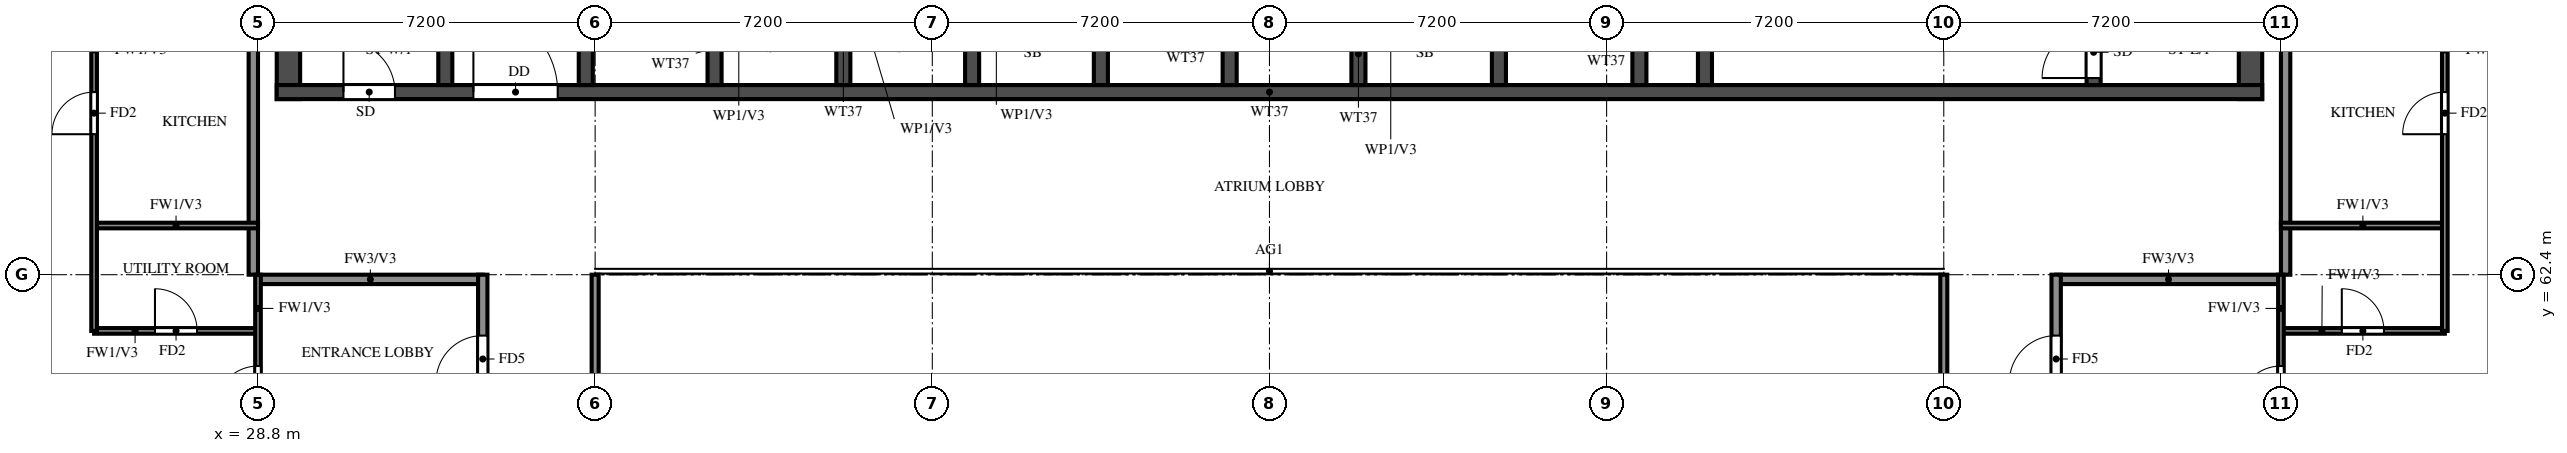
"""IFC4 building model, lengths in metres.
Left out: names, types, materials, properties, quantities, classifications, styles, units other than length and angle.
Written with IfcOpenShell. Run it as: python <this file> out.ifc"""

import sys

from ifc_helpers import new_model, si_unit, direction, frame, frame_2d, origin, place, context, subcontext, project, spatial, rectangle, extrude, element, fill, save


model = new_model("IFC4")
c1 = context("Model", 3, precision=1e-05, world=origin(), true_north=direction((0.0, 1.0)))
c2 = subcontext(c1, "Body", "Model", "MODEL_VIEW")
j1 = project(units=[si_unit("LENGTHUNIT", "METRE"), si_unit("PLANEANGLEUNIT", "RADIAN")], contexts=[c1])
p1 = place(None, origin())
s1 = spatial("IfcSite", under=j1, at=p1, CompositionType="ELEMENT")
p2 = place(p1, origin())
s2 = spatial("IfcBuilding", under=s1, at=p2, CompositionType="ELEMENT")
p3 = place(p2, frame((0.0, 0.0, 211.5)))
s3 = spatial("IfcBuildingStorey", under=s2, at=p3, CompositionType="ELEMENT", Elevation=211.5)
for number, where, z_axis, x_axis in (
    (1, (29.45, 66.15, 0.0), (0.0, 0.0, 1.0), (0.0, 1.0, 0.0)),
    (2, (71.35, 66.15, 0.0), (0.0, 0.0, 1.0), (0.0, 1.0, 0.0)),
):
    element("IfcWall", number, at=place(p3, frame(where, z_axis=z_axis, x_axis=x_axis)), inside=s3, PredefinedType="SHEAR", context=c2, shape_type="SweptSolid", body=[
        extrude(rectangle(XDim=11.85, YDim=0.5, at=frame_2d((5.925, 0.0))), origin(), (0.0, 0.0, 1.0), 3.22),
    ])
p4 = place(p3, frame((29.2, 66.3, 0.0), z_axis=(0.0, 0.0, 1.0), x_axis=(1.0, 0.0, 0.0)))
e3 = element("IfcWall", 3, at=p4, inside=s3, PredefinedType="SHEAR", context=c2, shape_type="SweptSolid", body=[
    extrude(rectangle(XDim=42.4, YDim=0.3, at=frame_2d((21.2, 0.0))), origin(), (0.0, 0.0, 1.0), 3.22),
])
p5 = place(p4, frame((1.425, 0.0, 0.0)))
e4 = element("IfcOpeningElement", 4, at=p5, cuts=e3, PredefinedType="OPENING", context=c2, shape_type="SweptSolid", body=[
    extrude(rectangle(XDim=1.1, YDim=2.1, at=frame_2d((0.55, 1.05))), frame((0.0, 0.16, 0.0), z_axis=(0.0, -1.0, 0.0), x_axis=(1.0, 0.0, 0.0)), (0.0, 0.0, 1.0), 0.32),
])
p6 = place(p4, frame((4.2, 0.0, 0.0)))
e5 = element("IfcOpeningElement", 5, at=p6, cuts=e3, PredefinedType="OPENING", context=c2, shape_type="SweptSolid", body=[
    extrude(rectangle(XDim=1.8, YDim=2.1, at=frame_2d((0.9, 1.05))), frame((0.0, 0.16, 0.0), z_axis=(0.0, -1.0, 0.0), x_axis=(1.0, 0.0, 0.0)), (0.0, 0.0, 1.0), 0.32),
])
p7 = place(p3, frame((32.8, 66.45, 0.0), z_axis=(0.0, 0.0, 1.0), x_axis=(0.0, 1.0, 0.0)))
e6 = element("IfcWall", 6, at=p7, inside=s3, PredefinedType="SHEAR", context=c2, shape_type="SweptSolid", body=[
    extrude(rectangle(XDim=11.05, YDim=0.3, at=frame_2d((5.525, 0.0))), origin(), (0.0, 0.0, 1.0), 3.22),
])
p8 = place(p3, frame((68.0, 66.45, 0.0), z_axis=(0.0, 0.0, 1.0), x_axis=(0.0, 1.0, 0.0)))
e7 = element("IfcWall", 7, at=p8, inside=s3, PredefinedType="SHEAR", context=c2, shape_type="SweptSolid", body=[
    extrude(rectangle(XDim=11.05, YDim=0.3, at=frame_2d((5.525, 0.0))), origin(), (0.0, 0.0, 1.0), 3.22),
])
p9 = place(p8, frame((0.15, 0.0, 0.0)))
e8 = element("IfcOpeningElement", 8, at=p9, cuts=e7, PredefinedType="OPENING", context=c2, shape_type="SweptSolid", body=[
    extrude(rectangle(XDim=1.1, YDim=2.1, at=frame_2d((0.55, 1.05))), frame((0.0, 0.16, 0.0), z_axis=(0.0, -1.0, 0.0), x_axis=(1.0, 0.0, 0.0)), (0.0, 0.0, 1.0), 0.32),
])
p10 = place(p3, frame((59.7, 66.45, 0.0), z_axis=(0.0, 0.0, 1.0), x_axis=(0.0, 1.0, 0.0)))
e9 = element("IfcWall", 9, at=p10, inside=s3, PredefinedType="SHEAR", context=c2, shape_type="SweptSolid", body=[
    extrude(rectangle(XDim=6.175, YDim=0.3, at=frame_2d((3.087, 0.0))), origin(), (0.0, 0.0, 1.0), 3.22),
])
p11 = place(p10, frame((3.85, 0.0, 0.0)))
e10 = element("IfcOpeningElement", 10, at=p11, cuts=e9, PredefinedType="OPENING", context=c2, shape_type="SweptSolid", body=[
    extrude(rectangle(XDim=1.2, YDim=2.1, at=frame_2d((0.6, 1.05))), frame((0.0, 0.16, 0.0), z_axis=(0.0, -1.0, 0.0), x_axis=(1.0, 0.0, 0.0)), (0.0, 0.0, 1.0), 0.32),
])
for number, where, z_axis, x_axis in (
    (11, (35.8, 66.45, 0.0), (0.0, 0.0, 1.0), (0.0, 1.0, 0.0)),
    (12, (38.55, 66.45, 0.0), (0.0, 0.0, 1.0), (0.0, 1.0, 0.0)),
    (13, (41.3, 66.45, 0.0), (0.0, 0.0, 1.0), (0.0, 1.0, 0.0)),
    (14, (44.05, 66.45, 0.0), (0.0, 0.0, 1.0), (0.0, 1.0, 0.0)),
    (15, (46.8, 66.45, 0.0), (0.0, 0.0, 1.0), (0.0, 1.0, 0.0)),
    (16, (49.55, 66.45, 0.0), (0.0, 0.0, 1.0), (0.0, 1.0, 0.0)),
    (17, (52.3, 66.45, 0.0), (0.0, 0.0, 1.0), (0.0, 1.0, 0.0)),
    (18, (55.3, 66.45, 0.0), (0.0, 0.0, 1.0), (0.0, 1.0, 0.0)),
    (19, (58.3, 66.45, 0.0), (0.0, 0.0, 1.0), (0.0, 1.0, 0.0)),
):
    element("IfcWall", number, at=place(p3, frame(where, z_axis=z_axis, x_axis=x_axis)), inside=s3, PredefinedType="SHEAR", context=c2, shape_type="SweptSolid", body=[
        extrude(rectangle(XDim=2.425, YDim=0.3, at=frame_2d((1.212, 0.0))), origin(), (0.0, 0.0, 1.0), 3.22),
    ])
for number, where, z_axis, x_axis in (
    (20, (28.8, 62.3, 0.0), (0.0, 0.0, 1.0), (1.0, 0.0, 0.0)),
    (21, (67.2, 62.3, 0.0), (0.0, 0.0, 1.0), (1.0, 0.0, 0.0)),
):
    element("IfcWall", number, at=place(p3, frame(where, z_axis=z_axis, x_axis=x_axis)), inside=s3, PredefinedType="SOLIDWALL", context=c2, shape_type="SweptSolid", body=[
        extrude(rectangle(XDim=4.8, YDim=0.2, at=frame_2d((2.4, 0.0))), origin(), (0.0, 0.0, 1.0), 3.22),
    ])
p12 = place(p3, frame((28.7, 62.4, 0.0), z_axis=(0.0, 0.0, 1.0), x_axis=(0.0, 1.0, 0.0)))
e22 = element("IfcWall", 22, at=p12, inside=s3, PredefinedType="SOLIDWALL", context=c2, shape_type="SweptSolid", body=[
    extrude(rectangle(XDim=15.6, YDim=0.2, at=frame_2d((7.8, 0.0))), origin(), (0.0, 0.0, 1.0), 3.22),
])
p13 = place(p3, frame((33.6, 56.4, 0.0), z_axis=(0.0, 0.0, 1.0), x_axis=(0.0, 1.0, 0.0)))
e23 = element("IfcWall", 23, at=p13, inside=s3, PredefinedType="SOLIDWALL", context=c2, shape_type="SweptSolid", body=[
    extrude(rectangle(XDim=6.0, YDim=0.2, at=frame_2d((3.0, 0.0))), origin(), (0.0, 0.0, 1.0), 3.22),
])
p14 = place(p13, frame((3.7, 0.0, 0.0)))
e24 = element("IfcOpeningElement", 24, at=p14, cuts=e23, PredefinedType="OPENING", context=c2, shape_type="SweptSolid", body=[
    extrude(rectangle(XDim=1.0, YDim=2.1, at=frame_2d((0.5, 1.05))), frame((0.0, 0.11, 0.0), z_axis=(0.0, -1.0, 0.0), x_axis=(1.0, 0.0, 0.0)), (0.0, 0.0, 1.0), 0.22),
])
p15 = place(p3, frame((67.2, 56.4, 0.0), z_axis=(0.0, 0.0, 1.0), x_axis=(0.0, 1.0, 0.0)))
e25 = element("IfcWall", 25, at=p15, inside=s3, PredefinedType="SOLIDWALL", context=c2, shape_type="SweptSolid", body=[
    extrude(rectangle(XDim=6.0, YDim=0.2, at=frame_2d((3.0, 0.0))), origin(), (0.0, 0.0, 1.0), 3.22),
])
p16 = place(p15, frame((3.7, 0.0, 0.0)))
e26 = element("IfcOpeningElement", 26, at=p16, cuts=e25, PredefinedType="OPENING", context=c2, shape_type="SweptSolid", body=[
    extrude(rectangle(XDim=1.0, YDim=2.1, at=frame_2d((0.5, 1.05))), frame((0.0, 0.11, 0.0), z_axis=(0.0, -1.0, 0.0), x_axis=(1.0, 0.0, 0.0)), (0.0, 0.0, 1.0), 0.22),
])
p17 = place(p3, frame((72.1, 62.4, 0.0), z_axis=(0.0, 0.0, 1.0), x_axis=(0.0, 1.0, 0.0)))
e27 = element("IfcWall", 27, at=p17, inside=s3, PredefinedType="SOLIDWALL", context=c2, shape_type="SweptSolid", body=[
    extrude(rectangle(XDim=15.6, YDim=0.2, at=frame_2d((7.8, 0.0))), origin(), (0.0, 0.0, 1.0), 3.22),
])
p18 = place(p3, frame((25.3, 61.2, 0.0), z_axis=(0.0, 0.0, 1.0), x_axis=(1.0, 0.0, 0.0)))
e28 = element("IfcWall", 28, at=p18, inside=s3, PredefinedType="PARTITIONING", context=c2, shape_type="SweptSolid", body=[
    extrude(rectangle(XDim=3.5, YDim=0.12, at=frame_2d((1.75, 0.0))), origin(), (0.0, 0.0, 1.0), 3.22),
])
p19 = place(p18, frame((1.3, 0.0, 0.0)))
e29 = element("IfcOpeningElement", 29, at=p19, cuts=e28, PredefinedType="OPENING", context=c2, shape_type="SweptSolid", body=[
    extrude(rectangle(XDim=0.9, YDim=2.1, at=frame_2d((0.45, 1.05))), frame((0.0, 0.07, 0.0), z_axis=(0.0, -1.0, 0.0), x_axis=(1.0, 0.0, 0.0)), (0.0, 0.0, 1.0), 0.14),
])
p20 = place(p3, frame((72.0, 61.2, 0.0), z_axis=(0.0, 0.0, 1.0), x_axis=(1.0, 0.0, 0.0)))
e30 = element("IfcWall", 30, at=p20, inside=s3, PredefinedType="PARTITIONING", context=c2, shape_type="SweptSolid", body=[
    extrude(rectangle(XDim=3.5, YDim=0.12, at=frame_2d((1.75, 0.0))), origin(), (0.0, 0.0, 1.0), 3.22),
])
p21 = place(p20, frame((1.3, 0.0, 0.0)))
e31 = element("IfcOpeningElement", 31, at=p21, cuts=e30, PredefinedType="OPENING", context=c2, shape_type="SweptSolid", body=[
    extrude(rectangle(XDim=0.9, YDim=2.1, at=frame_2d((0.45, 1.05))), frame((0.0, 0.07, 0.0), z_axis=(0.0, -1.0, 0.0), x_axis=(1.0, 0.0, 0.0)), (0.0, 0.0, 1.0), 0.14),
])
for number, where, z_axis, x_axis in (
    (32, (25.3, 63.45, 0.0), (0.0, 0.0, 1.0), (1.0, 0.0, 0.0)),
    (33, (72.0, 63.45, 0.0), (0.0, 0.0, 1.0), (1.0, 0.0, 0.0)),
):
    element("IfcWall", number, at=place(p3, frame(where, z_axis=z_axis, x_axis=x_axis)), inside=s3, PredefinedType="PARTITIONING", context=c2, shape_type="SweptSolid", body=[
        extrude(rectangle(XDim=3.5, YDim=0.12, at=frame_2d((1.75, 0.0))), origin(), (0.0, 0.0, 1.0), 3.22),
    ])
p22 = place(p3, frame((25.3, 61.2, 0.0), z_axis=(0.0, 0.0, 1.0), x_axis=(0.0, 1.0, 0.0)))
e34 = element("IfcWall", 34, at=p22, inside=s3, PredefinedType="PARTITIONING", context=c2, shape_type="SweptSolid", body=[
    extrude(rectangle(XDim=12.0, YDim=0.12, at=frame_2d((6.0, 0.0))), origin(), (0.0, 0.0, 1.0), 3.22),
])
p23 = place(p22, frame((4.2, 0.0, 0.0)))
e35 = element("IfcOpeningElement", 35, at=p23, cuts=e34, PredefinedType="OPENING", context=c2, shape_type="SweptSolid", body=[
    extrude(rectangle(XDim=0.9, YDim=2.1, at=frame_2d((0.45, 1.05))), frame((0.0, 0.07, 0.0), z_axis=(0.0, -1.0, 0.0), x_axis=(1.0, 0.0, 0.0)), (0.0, 0.0, 1.0), 0.14),
])
p24 = place(p22, frame((7.975, 0.0, 0.0)))
e36 = element("IfcOpeningElement", 36, at=p24, cuts=e34, PredefinedType="OPENING", context=c2, shape_type="SweptSolid", body=[
    extrude(rectangle(XDim=0.8, YDim=2.1, at=frame_2d((0.4, 1.05))), frame((0.0, 0.07, 0.0), z_axis=(0.0, -1.0, 0.0), x_axis=(1.0, 0.0, 0.0)), (0.0, 0.0, 1.0), 0.14),
])
p25 = place(p22, frame((10.45, 0.0, 0.0)))
e37 = element("IfcOpeningElement", 37, at=p25, cuts=e34, PredefinedType="OPENING", context=c2, shape_type="SweptSolid", body=[
    extrude(rectangle(XDim=0.8, YDim=2.1, at=frame_2d((0.4, 1.05))), frame((0.0, 0.07, 0.0), z_axis=(0.0, -1.0, 0.0), x_axis=(1.0, 0.0, 0.0)), (0.0, 0.0, 1.0), 0.14),
])
p26 = place(p3, frame((28.8, 58.8, 0.0), z_axis=(0.0, 0.0, 1.0), x_axis=(0.0, 1.0, 0.0)))
e38 = element("IfcWall", 38, at=p26, inside=s3, PredefinedType="PARTITIONING", context=c2, shape_type="SweptSolid", body=[
    extrude(rectangle(XDim=3.6, YDim=0.12, at=frame_2d((1.8, 0.0))), origin(), (0.0, 0.0, 1.0), 3.22),
])
p27 = place(p26, frame((0.75, 0.0, 0.0)))
e39 = element("IfcOpeningElement", 39, at=p27, cuts=e38, PredefinedType="OPENING", context=c2, shape_type="SweptSolid", body=[
    extrude(rectangle(XDim=0.9, YDim=2.1, at=frame_2d((0.45, 1.05))), frame((0.0, 0.07, 0.0), z_axis=(0.0, -1.0, 0.0), x_axis=(1.0, 0.0, 0.0)), (0.0, 0.0, 1.0), 0.14),
])
p28 = place(p3, frame((72.0, 58.8, 0.0), z_axis=(0.0, 0.0, 1.0), x_axis=(0.0, 1.0, 0.0)))
e40 = element("IfcWall", 40, at=p28, inside=s3, PredefinedType="PARTITIONING", context=c2, shape_type="SweptSolid", body=[
    extrude(rectangle(XDim=3.6, YDim=0.12, at=frame_2d((1.8, 0.0))), origin(), (0.0, 0.0, 1.0), 3.22),
])
p29 = place(p28, frame((0.75, 0.0, 0.0)))
e41 = element("IfcOpeningElement", 41, at=p29, cuts=e40, PredefinedType="OPENING", context=c2, shape_type="SweptSolid", body=[
    extrude(rectangle(XDim=0.9, YDim=2.1, at=frame_2d((0.45, 1.05))), frame((0.0, 0.07, 0.0), z_axis=(0.0, -1.0, 0.0), x_axis=(1.0, 0.0, 0.0)), (0.0, 0.0, 1.0), 0.14),
])
p30 = place(p3, frame((75.5, 61.2, 0.0), z_axis=(0.0, 0.0, 1.0), x_axis=(0.0, 1.0, 0.0)))
e42 = element("IfcWall", 42, at=p30, inside=s3, PredefinedType="PARTITIONING", context=c2, shape_type="SweptSolid", body=[
    extrude(rectangle(XDim=12.0, YDim=0.12, at=frame_2d((6.0, 0.0))), origin(), (0.0, 0.0, 1.0), 3.22),
])
p31 = place(p30, frame((4.2, 0.0, 0.0)))
e43 = element("IfcOpeningElement", 43, at=p31, cuts=e42, PredefinedType="OPENING", context=c2, shape_type="SweptSolid", body=[
    extrude(rectangle(XDim=0.9, YDim=2.1, at=frame_2d((0.45, 1.05))), frame((0.0, 0.07, 0.0), z_axis=(0.0, -1.0, 0.0), x_axis=(1.0, 0.0, 0.0)), (0.0, 0.0, 1.0), 0.14),
])
p32 = place(p30, frame((7.975, 0.0, 0.0)))
e44 = element("IfcOpeningElement", 44, at=p32, cuts=e42, PredefinedType="OPENING", context=c2, shape_type="SweptSolid", body=[
    extrude(rectangle(XDim=0.8, YDim=2.1, at=frame_2d((0.4, 1.05))), frame((0.0, 0.07, 0.0), z_axis=(0.0, -1.0, 0.0), x_axis=(1.0, 0.0, 0.0)), (0.0, 0.0, 1.0), 0.14),
])
p33 = place(p30, frame((10.45, 0.0, 0.0)))
e45 = element("IfcOpeningElement", 45, at=p33, cuts=e42, PredefinedType="OPENING", context=c2, shape_type="SweptSolid", body=[
    extrude(rectangle(XDim=0.8, YDim=2.1, at=frame_2d((0.4, 1.05))), frame((0.0, 0.07, 0.0), z_axis=(0.0, -1.0, 0.0), x_axis=(1.0, 0.0, 0.0)), (0.0, 0.0, 1.0), 0.14),
])
for number, where, z_axis, x_axis in (
    (46, (36.0, 48.0, 0.0), (0.0, 0.0, 1.0), (0.0, 1.0, 0.0)),
    (47, (64.8, 48.0, 0.0), (0.0, 0.0, 1.0), (0.0, 1.0, 0.0)),
):
    element("IfcWall", number, at=place(p3, frame(where, z_axis=z_axis, x_axis=x_axis)), inside=s3, PredefinedType="SOLIDWALL", context=c2, shape_type="SweptSolid", body=[
        extrude(rectangle(XDim=14.4, YDim=0.15, at=frame_2d((7.2, 0.0))), origin(), (0.0, 0.0, 1.0), 2.32),
    ])
p34 = place(p5, origin())
e48 = element("IfcDoor", 48, at=p34, inside=s3, OperationType="SINGLE_SWING_LEFT", PredefinedType="DOOR", context=c2, shape_type="SweptSolid", body=[
    extrude(rectangle(XDim=1.1, YDim=2.1, at=frame_2d((0.55, 1.05))), frame((0.0, 0.025, 0.0), z_axis=(0.0, -1.0, 0.0), x_axis=(1.0, 0.0, 0.0)), (0.0, 0.0, 1.0), 0.05),
])
fill(e4, e48)
p35 = place(p9, origin())
e49 = element("IfcDoor", 49, at=p35, inside=s3, OperationType="SINGLE_SWING_RIGHT", PredefinedType="DOOR", context=c2, shape_type="SweptSolid", body=[
    extrude(rectangle(XDim=1.1, YDim=2.1, at=frame_2d((0.55, 1.05))), frame((0.0, 0.025, 0.0), z_axis=(0.0, -1.0, 0.0), x_axis=(1.0, 0.0, 0.0)), (0.0, 0.0, 1.0), 0.05),
])
fill(e8, e49)
p36 = place(p6, origin())
e50 = element("IfcDoor", 50, at=p36, inside=s3, OperationType="DOUBLE_DOOR_SINGLE_SWING", PredefinedType="DOOR", context=c2, shape_type="SweptSolid", body=[
    extrude(rectangle(XDim=1.8, YDim=2.1, at=frame_2d((0.9, 1.05))), frame((0.0, 0.025, 0.0), z_axis=(0.0, -1.0, 0.0), x_axis=(1.0, 0.0, 0.0)), (0.0, 0.0, 1.0), 0.05),
])
fill(e5, e50)
p37 = place(p27, origin())
e51 = element("IfcDoor", 51, at=p37, inside=s3, OperationType="SINGLE_SWING_RIGHT", PredefinedType="DOOR", context=c2, shape_type="SweptSolid", body=[
    extrude(rectangle(XDim=0.9, YDim=2.1, at=frame_2d((0.45, 1.05))), frame((0.0, 0.025, 0.0), z_axis=(0.0, -1.0, 0.0), x_axis=(1.0, 0.0, 0.0)), (0.0, 0.0, 1.0), 0.05),
])
fill(e39, e51)
p38 = place(p14, origin())
e52 = element("IfcDoor", 52, at=p38, inside=s3, OperationType="SINGLE_SWING_LEFT", PredefinedType="DOOR", context=c2, shape_type="SweptSolid", body=[
    extrude(rectangle(XDim=1.0, YDim=2.1, at=frame_2d((0.5, 1.05))), frame((0.0, 0.025, 0.0), z_axis=(0.0, -1.0, 0.0), x_axis=(1.0, 0.0, 0.0)), (0.0, 0.0, 1.0), 0.05),
])
fill(e24, e52)
p39 = place(p19, origin())
e53 = element("IfcDoor", 53, at=p39, inside=s3, OperationType="SINGLE_SWING_RIGHT", PredefinedType="DOOR", context=c2, shape_type="SweptSolid", body=[
    extrude(rectangle(XDim=0.9, YDim=2.1, at=frame_2d((0.45, 1.05))), frame((0.0, 0.025, 0.0), z_axis=(0.0, -1.0, 0.0), x_axis=(1.0, 0.0, 0.0)), (0.0, 0.0, 1.0), 0.05),
])
fill(e29, e53)
p40 = place(p23, origin())
e54 = element("IfcDoor", 54, at=p40, inside=s3, OperationType="SINGLE_SWING_LEFT", PredefinedType="DOOR", context=c2, shape_type="SweptSolid", body=[
    extrude(rectangle(XDim=0.9, YDim=2.1, at=frame_2d((0.45, 1.05))), frame((0.0, 0.025, 0.0), z_axis=(0.0, -1.0, 0.0), x_axis=(1.0, 0.0, 0.0)), (0.0, 0.0, 1.0), 0.05),
])
fill(e35, e54)
p41 = place(p29, origin())
e55 = element("IfcDoor", 55, at=p41, inside=s3, OperationType="SINGLE_SWING_LEFT", PredefinedType="DOOR", context=c2, shape_type="SweptSolid", body=[
    extrude(rectangle(XDim=0.9, YDim=2.1, at=frame_2d((0.45, 1.05))), frame((0.0, 0.025, 0.0), z_axis=(0.0, -1.0, 0.0), x_axis=(1.0, 0.0, 0.0)), (0.0, 0.0, 1.0), 0.05),
])
fill(e41, e55)
p42 = place(p16, origin())
e56 = element("IfcDoor", 56, at=p42, inside=s3, OperationType="SINGLE_SWING_LEFT", PredefinedType="DOOR", context=c2, shape_type="SweptSolid", body=[
    extrude(rectangle(XDim=1.0, YDim=2.1, at=frame_2d((0.5, 1.05))), frame((0.0, 0.025, 0.0), z_axis=(0.0, -1.0, 0.0), x_axis=(1.0, 0.0, 0.0)), (0.0, 0.0, 1.0), 0.05),
])
fill(e26, e56)
p43 = place(p21, origin())
e57 = element("IfcDoor", 57, at=p43, inside=s3, OperationType="SINGLE_SWING_LEFT", PredefinedType="DOOR", context=c2, shape_type="SweptSolid", body=[
    extrude(rectangle(XDim=0.9, YDim=2.1, at=frame_2d((0.45, 1.05))), frame((0.0, 0.025, 0.0), z_axis=(0.0, -1.0, 0.0), x_axis=(1.0, 0.0, 0.0)), (0.0, 0.0, 1.0), 0.05),
])
fill(e31, e57)
p44 = place(p31, origin())
e58 = element("IfcDoor", 58, at=p44, inside=s3, OperationType="SINGLE_SWING_LEFT", PredefinedType="DOOR", context=c2, shape_type="SweptSolid", body=[
    extrude(rectangle(XDim=0.9, YDim=2.1, at=frame_2d((0.45, 1.05))), frame((0.0, 0.025, 0.0), z_axis=(0.0, -1.0, 0.0), x_axis=(1.0, 0.0, 0.0)), (0.0, 0.0, 1.0), 0.05),
])
fill(e43, e58)
save(model, sys.argv[1])
